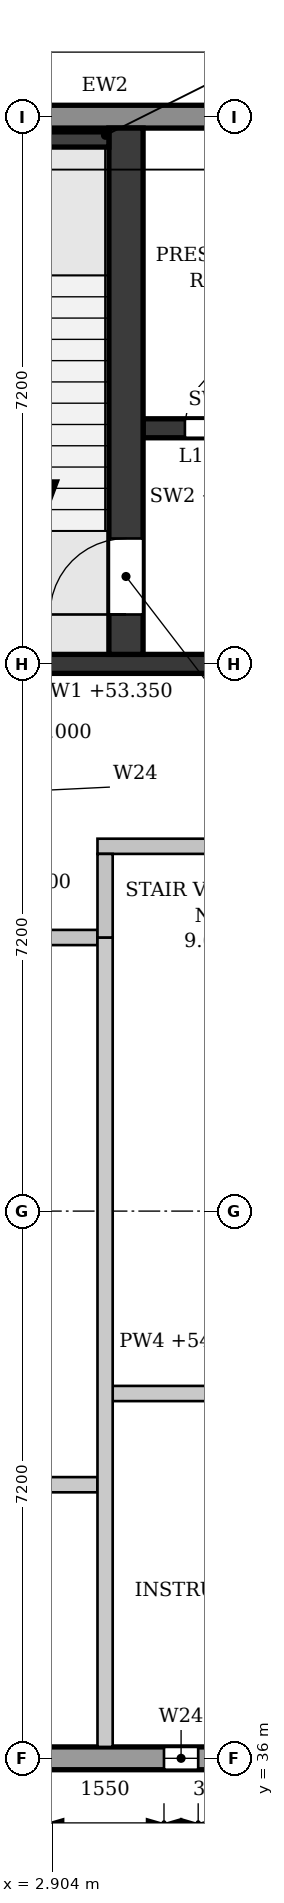
"""IFC4 building model, lengths in metres.
Left out: names, types, materials, properties, quantities, classifications, styles, units other than length and angle.
Written with IfcOpenShell. Run it as: python <this file> out.ifc"""

import sys

from ifc_helpers import new_model, si_unit, direction, frame, frame_2d, origin, place, context, subcontext, project, spatial, polyline, rectangle, outline, extrude, element, fill, save


model = new_model("IFC4")
c1 = context("Model", 3, precision=1e-05, world=origin(), true_north=direction((0.0, 1.0)))
c2 = subcontext(c1, "Body", "Model", "MODEL_VIEW")
j1 = project(units=[si_unit("LENGTHUNIT", "METRE"), si_unit("PLANEANGLEUNIT", "RADIAN")], contexts=[c1])
p1 = place(None, origin())
s1 = spatial("IfcSite", under=j1, at=p1, CompositionType="ELEMENT")
p2 = place(p1, origin())
s2 = spatial("IfcBuilding", under=s1, at=p2, CompositionType="ELEMENT")
p3 = place(p2, frame((0.0, 0.0, 49.8)))
s3 = spatial("IfcBuildingStorey", under=s2, at=p3, CompositionType="ELEMENT", Elevation=49.8)
p4 = place(p3, frame((6.8, 57.6, 0.0), z_axis=(0.0, 0.0, 1.0), x_axis=(-1.0, 0.0, 0.0)))
e1 = element("IfcWall", 1, at=p4, inside=s3, PredefinedType="STANDARD", context=c2, shape_type="SweptSolid", body=[
    extrude(rectangle(XDim=6.4, YDim=0.3, at=frame_2d((3.2, 0.0))), origin(), (0.0, 0.0, 1.0), 3.6),
])
p5 = place(p4, frame((4.55, 0.0, 0.9)))
e2 = element("IfcOpeningElement", 2, at=p5, cuts=e1, PredefinedType="OPENING", context=c2, shape_type="SweptSolid", body=[
    extrude(outline(polyline([(0.0, 0.0), (0.9, 0.0), (0.9, 2.15), (0.45, 2.6), (0.0, 2.15), (0.0, 0.0)])), frame((0.0, 0.16, 0.0), z_axis=(0.0, -1.0, 0.0), x_axis=(1.0, 0.0, 0.0)), (0.0, 0.0, 1.0), 0.32),
])
p6 = place(p3, frame((0.4, 36.0, 0.0), z_axis=(0.0, 0.0, 1.0), x_axis=(1.0, 0.0, 0.0)))
e3 = element("IfcWall", 3, at=p6, inside=s3, PredefinedType="STANDARD", context=c2, shape_type="SweptSolid", body=[
    extrude(rectangle(XDim=6.4, YDim=0.3, at=frame_2d((3.2, 0.0))), origin(), (0.0, 0.0, 1.0), 3.6),
])
p7 = place(p6, frame((0.375, 0.0, 0.9)))
e4 = element("IfcOpeningElement", 4, at=p7, cuts=e3, PredefinedType="OPENING", context=c2, shape_type="SweptSolid", body=[
    extrude(outline(polyline([(0.0, 0.0), (0.45, 0.0), (0.45, 2.35), (0.225, 2.6), (0.0, 2.35), (0.0, 0.0)])), frame((0.0, 0.16, 0.0), z_axis=(0.0, -1.0, 0.0), x_axis=(1.0, 0.0, 0.0)), (0.0, 0.0, 1.0), 0.32),
])
p8 = place(p6, frame((1.175, 0.0, 0.9)))
e5 = element("IfcOpeningElement", 5, at=p8, cuts=e3, PredefinedType="OPENING", context=c2, shape_type="SweptSolid", body=[
    extrude(outline(polyline([(0.0, 0.0), (0.45, 0.0), (0.45, 2.35), (0.225, 2.6), (0.0, 2.35), (0.0, 0.0)])), frame((0.0, 0.16, 0.0), z_axis=(0.0, -1.0, 0.0), x_axis=(1.0, 0.0, 0.0)), (0.0, 0.0, 1.0), 0.32),
])
p9 = place(p6, frame((1.975, 0.0, 0.9)))
e6 = element("IfcOpeningElement", 6, at=p9, cuts=e3, PredefinedType="OPENING", context=c2, shape_type="SweptSolid", body=[
    extrude(outline(polyline([(0.0, 0.0), (0.45, 0.0), (0.45, 2.35), (0.225, 2.6), (0.0, 2.35), (0.0, 0.0)])), frame((0.0, 0.16, 0.0), z_axis=(0.0, -1.0, 0.0), x_axis=(1.0, 0.0, 0.0)), (0.0, 0.0, 1.0), 0.32),
])
p10 = place(p6, frame((3.975, 0.0, 0.9)))
e7 = element("IfcOpeningElement", 7, at=p10, cuts=e3, PredefinedType="OPENING", context=c2, shape_type="SweptSolid", body=[
    extrude(outline(polyline([(0.0, 0.0), (0.45, 0.0), (0.45, 2.35), (0.225, 2.6), (0.0, 2.35), (0.0, 0.0)])), frame((0.0, 0.16, 0.0), z_axis=(0.0, -1.0, 0.0), x_axis=(1.0, 0.0, 0.0)), (0.0, 0.0, 1.0), 0.32),
])
p11 = place(p6, frame((4.775, 0.0, 0.9)))
e8 = element("IfcOpeningElement", 8, at=p11, cuts=e3, PredefinedType="OPENING", context=c2, shape_type="SweptSolid", body=[
    extrude(outline(polyline([(0.0, 0.0), (0.45, 0.0), (0.45, 2.35), (0.225, 2.6), (0.0, 2.35), (0.0, 0.0)])), frame((0.0, 0.16, 0.0), z_axis=(0.0, -1.0, 0.0), x_axis=(1.0, 0.0, 0.0)), (0.0, 0.0, 1.0), 0.32),
])
p12 = place(p6, frame((5.575, 0.0, 0.9)))
e9 = element("IfcOpeningElement", 9, at=p12, cuts=e3, PredefinedType="OPENING", context=c2, shape_type="SweptSolid", body=[
    extrude(outline(polyline([(0.0, 0.0), (0.45, 0.0), (0.45, 2.35), (0.225, 2.6), (0.0, 2.35), (0.0, 0.0)])), frame((0.0, 0.16, 0.0), z_axis=(0.0, -1.0, 0.0), x_axis=(1.0, 0.0, 0.0)), (0.0, 0.0, 1.0), 0.32),
])
p13 = place(p3, frame((0.4, 50.4, 0.0), z_axis=(0.0, 0.0, 1.0), x_axis=(1.0, 0.0, 0.0)))
e10 = element("IfcWall", 10, at=p13, inside=s3, PredefinedType="SHEAR", context=c2, shape_type="SweptSolid", body=[
    extrude(rectangle(XDim=6.4, YDim=0.25, at=frame_2d((3.2, 0.0))), origin(), (0.0, 0.0, 1.0), 3.55),
])
p14 = place(p13, frame((4.85, 0.0, 0.0)))
e11 = element("IfcOpeningElement", 11, at=p14, cuts=e10, PredefinedType="OPENING", context=c2, shape_type="SweptSolid", body=[
    extrude(rectangle(XDim=1.1, YDim=2.1, at=frame_2d((0.55, 1.05))), frame((0.0, 0.135, 0.0), z_axis=(0.0, -1.0, 0.0), x_axis=(1.0, 0.0, 0.0)), (0.0, 0.0, 1.0), 0.27),
])
p15 = place(p3, frame((2.25, 57.3, -0.25), z_axis=(0.0, 0.0, 1.0), x_axis=(1.0, 0.0, 0.0)))
e12 = element("IfcWall", 12, at=p15, inside=s3, PredefinedType="SHEAR", context=c2, shape_type="SweptSolid", body=[
    extrude(rectangle(XDim=1.4, YDim=0.2, at=frame_2d((0.7, 0.0))), origin(), (0.0, 0.0, 1.0), 4.45),
])
p16 = place(p3, frame((3.875, 50.525, 0.0), z_axis=(0.0, 0.0, 1.0), x_axis=(0.0, 1.0, 0.0)))
e13 = element("IfcWall", 13, at=p16, inside=s3, PredefinedType="SHEAR", context=c2, shape_type="SweptSolid", body=[
    extrude(rectangle(XDim=6.925, YDim=0.45, at=frame_2d((3.462, 0.0))), origin(), (0.0, 0.0, 1.0), 4.2),
])
p17 = place(p16, frame((0.525, 0.0, 0.0)))
e14 = element("IfcOpeningElement", 14, at=p17, cuts=e13, PredefinedType="OPENING", context=c2, shape_type="SweptSolid", body=[
    extrude(rectangle(XDim=1.0, YDim=2.1, at=frame_2d((0.5, 1.05))), frame((0.0, 0.235, 0.0), z_axis=(0.0, -1.0, 0.0), x_axis=(1.0, 0.0, 0.0)), (0.0, 0.0, 1.0), 0.47),
])
p18 = place(p3, frame((4.1, 53.5, 0.0), z_axis=(0.0, 0.0, 1.0), x_axis=(1.0, 0.0, 0.0)))
e15 = element("IfcWall", 15, at=p18, inside=s3, PredefinedType="SHEAR", context=c2, shape_type="SweptSolid", body=[
    extrude(rectangle(XDim=2.975, YDim=0.25, at=frame_2d((1.487, 0.0))), origin(), (0.0, 0.0, 1.0), 4.2),
])
p19 = place(p18, frame((0.55, 0.0, 0.0)))
e16 = element("IfcOpeningElement", 16, at=p19, cuts=e15, PredefinedType="OPENING", context=c2, shape_type="SweptSolid", body=[
    extrude(rectangle(XDim=0.9, YDim=2.1, at=frame_2d((0.45, 1.05))), frame((0.0, 0.135, 0.0), z_axis=(0.0, -1.0, 0.0), x_axis=(1.0, 0.0, 0.0)), (0.0, 0.0, 1.0), 0.27),
])
p20 = place(p3, frame((0.15, 39.6, 0.0), z_axis=(0.0, 0.0, 1.0), x_axis=(1.0, 0.0, 0.0)))
e17 = element("IfcWall", 17, at=p20, inside=s3, PredefinedType="PARTITIONING", context=c2, shape_type="SweptSolid", body=[
    extrude(outline(polyline([(0.0, 0.0), (3.35, 0.0), (3.35, 4.2), (0.05, 4.2), (0.05, 3.6), (0.0, 3.6), (0.0, 0.0)])), frame((0.0, 0.1, 0.0), z_axis=(0.0, -1.0, 0.0), x_axis=(1.0, 0.0, 0.0)), (0.0, 0.0, 1.0), 0.2),
])
p21 = place(p20, frame((1.175, 0.0, 0.0)))
e18 = element("IfcOpeningElement", 18, at=p21, cuts=e17, PredefinedType="OPENING", context=c2, shape_type="SweptSolid", body=[
    extrude(rectangle(XDim=1.0, YDim=2.1, at=frame_2d((0.5, 1.05))), frame((0.0, 0.11, 0.0), z_axis=(0.0, -1.0, 0.0), x_axis=(1.0, 0.0, 0.0)), (0.0, 0.0, 1.0), 0.22),
])
p22 = place(p3, frame((3.7, 40.8, 0.0), z_axis=(0.0, 0.0, 1.0), x_axis=(1.0, 0.0, 0.0)))
e19 = element("IfcWall", 19, at=p22, inside=s3, PredefinedType="PARTITIONING", context=c2, shape_type="SweptSolid", body=[
    extrude(outline(polyline([(0.0, 0.0), (10.6, 0.0), (10.6, 3.55), (10.475, 3.55), (10.475, 4.2), (3.725, 4.2), (3.725, 3.55), (3.275, 3.55), (3.275, 4.2), (0.0, 4.2), (0.0, 0.0)])), frame((0.0, 0.1, 0.0), z_axis=(0.0, -1.0, 0.0), x_axis=(1.0, 0.0, 0.0)), (0.0, 0.0, 1.0), 0.2),
])
p23 = place(p22, frame((1.25, 0.0, 0.0)))
e20 = element("IfcOpeningElement", 20, at=p23, cuts=e19, PredefinedType="OPENING", context=c2, shape_type="SweptSolid", body=[
    extrude(rectangle(XDim=1.0, YDim=2.1, at=frame_2d((0.5, 1.05))), frame((0.0, 0.11, 0.0), z_axis=(0.0, -1.0, 0.0), x_axis=(1.0, 0.0, 0.0)), (0.0, 0.0, 1.0), 0.22),
])
p24 = place(p22, frame((6.55, 0.0, 0.0)))
e21 = element("IfcOpeningElement", 21, at=p24, cuts=e19, PredefinedType="OPENING", context=c2, shape_type="SweptSolid", body=[
    extrude(rectangle(XDim=1.0, YDim=2.1, at=frame_2d((0.5, 1.05))), frame((0.0, 0.11, 0.0), z_axis=(0.0, -1.0, 0.0), x_axis=(1.0, 0.0, 0.0)), (0.0, 0.0, 1.0), 0.22),
])
p25 = place(p3, frame((0.15, 46.8, 0.0), z_axis=(0.0, 0.0, 1.0), x_axis=(1.0, 0.0, 0.0)))
e22 = element("IfcWall", 22, at=p25, inside=s3, PredefinedType="PARTITIONING", context=c2, shape_type="SweptSolid", body=[
    extrude(outline(polyline([(0.0, 0.0), (3.35, 0.0), (3.35, 4.2), (0.05, 4.2), (0.05, 3.6), (0.0, 3.6), (0.0, 0.0)])), frame((0.0, 0.1, 0.0), z_axis=(0.0, -1.0, 0.0), x_axis=(1.0, 0.0, 0.0)), (0.0, 0.0, 1.0), 0.2),
])
p26 = place(p25, frame((1.175, 0.0, 0.0)))
e23 = element("IfcOpeningElement", 23, at=p26, cuts=e22, PredefinedType="OPENING", context=c2, shape_type="SweptSolid", body=[
    extrude(rectangle(XDim=1.0, YDim=2.1, at=frame_2d((0.5, 1.05))), frame((0.0, 0.11, 0.0), z_axis=(0.0, -1.0, 0.0), x_axis=(1.0, 0.0, 0.0)), (0.0, 0.0, 1.0), 0.22),
])
p27 = place(p3, frame((3.5, 48.0, 0.0), z_axis=(0.0, 0.0, 1.0), x_axis=(1.0, 0.0, 0.0)))
e24 = element("IfcWall", 24, at=p27, inside=s3, PredefinedType="PARTITIONING", context=c2, shape_type="SweptSolid", body=[
    extrude(outline(polyline([(0.0, 0.0), (14.6, 0.0), (14.6, 4.2), (11.125, 4.2), (11.125, 3.55), (10.675, 3.55), (10.675, 4.2), (3.925, 4.2), (3.925, 3.55), (3.475, 3.55), (3.475, 4.2), (0.0, 4.2), (0.0, 0.0)])), frame((0.0, 0.1, 0.0), z_axis=(0.0, -1.0, 0.0), x_axis=(1.0, 0.0, 0.0)), (0.0, 0.0, 1.0), 0.2),
])
p28 = place(p27, frame((5.0, 0.0, 0.0)))
e25 = element("IfcOpeningElement", 25, at=p28, cuts=e24, PredefinedType="OPENING", context=c2, shape_type="SweptSolid", body=[
    extrude(rectangle(XDim=1.0, YDim=2.1, at=frame_2d((0.5, 1.05))), frame((0.0, 0.11, 0.0), z_axis=(0.0, -1.0, 0.0), x_axis=(1.0, 0.0, 0.0)), (0.0, 0.0, 1.0), 0.22),
])
p29 = place(p3, frame((3.6, 36.15, 0.0), z_axis=(0.0, 0.0, 1.0), x_axis=(0.0, 1.0, 0.0)))
e26 = element("IfcWall", 26, at=p29, inside=s3, PredefinedType="PARTITIONING", context=c2, shape_type="SweptSolid", body=[
    extrude(outline(polyline([(0.0, 0.0), (10.65, 0.0), (10.65, 4.2), (7.275, 4.2), (7.275, 3.55), (6.825, 3.55), (6.825, 4.2), (0.05, 4.2), (0.05, 3.6), (0.0, 3.6), (0.0, 0.0)])), frame((0.0, 0.1, 0.0), z_axis=(0.0, -1.0, 0.0), x_axis=(1.0, 0.0, 0.0)), (0.0, 0.0, 1.0), 0.2),
])
p30 = place(p3, frame((3.6, 46.8, 0.0), z_axis=(0.0, 0.0, 1.0), x_axis=(0.0, 1.0, 0.0)))
e27 = element("IfcWall", 27, at=p30, inside=s3, PredefinedType="PARTITIONING", context=c2, shape_type="SweptSolid", body=[
    extrude(rectangle(XDim=1.1, YDim=0.2, at=frame_2d((0.55, 0.0))), origin(), (0.0, 0.0, 1.0), 4.2),
])
p31 = place(p10, origin())
e28 = element("IfcWindow", 28, at=p31, inside=s3, PartitioningType="SINGLE_PANEL", PredefinedType="WINDOW", context=c2, shape_type="SweptSolid", body=[
    extrude(outline(polyline([(0.0, 0.0), (0.45, 0.0), (0.45, 2.35), (0.225, 2.6), (0.0, 2.35), (0.0, 0.0)])), frame((0.0, 0.03, 0.0), z_axis=(0.0, -1.0, 0.0), x_axis=(1.0, 0.0, 0.0)), (0.0, 0.0, 1.0), 0.06),
])
fill(e7, e28)
p32 = place(p17, origin())
e29 = element("IfcDoor", 29, at=p32, inside=s3, OperationType="SINGLE_SWING_LEFT", PredefinedType="DOOR", context=c2, shape_type="SweptSolid", body=[
    extrude(rectangle(XDim=1.0, YDim=2.1, at=frame_2d((0.5, 1.05))), frame((0.0, 0.025, 0.0), z_axis=(0.0, -1.0, 0.0), x_axis=(1.0, 0.0, 0.0)), (0.0, 0.0, 1.0), 0.05),
])
fill(e14, e29)
p33 = place(p19, origin())
e30 = element("IfcDoor", 30, at=p33, inside=s3, OperationType="SINGLE_SWING_RIGHT", PredefinedType="DOOR", context=c2, shape_type="SweptSolid", body=[
    extrude(rectangle(XDim=0.9, YDim=2.1, at=frame_2d((0.45, 1.05))), frame((0.0, 0.025, 0.0), z_axis=(0.0, -1.0, 0.0), x_axis=(1.0, 0.0, 0.0)), (0.0, 0.0, 1.0), 0.05),
])
fill(e16, e30)
save(model, sys.argv[1])
